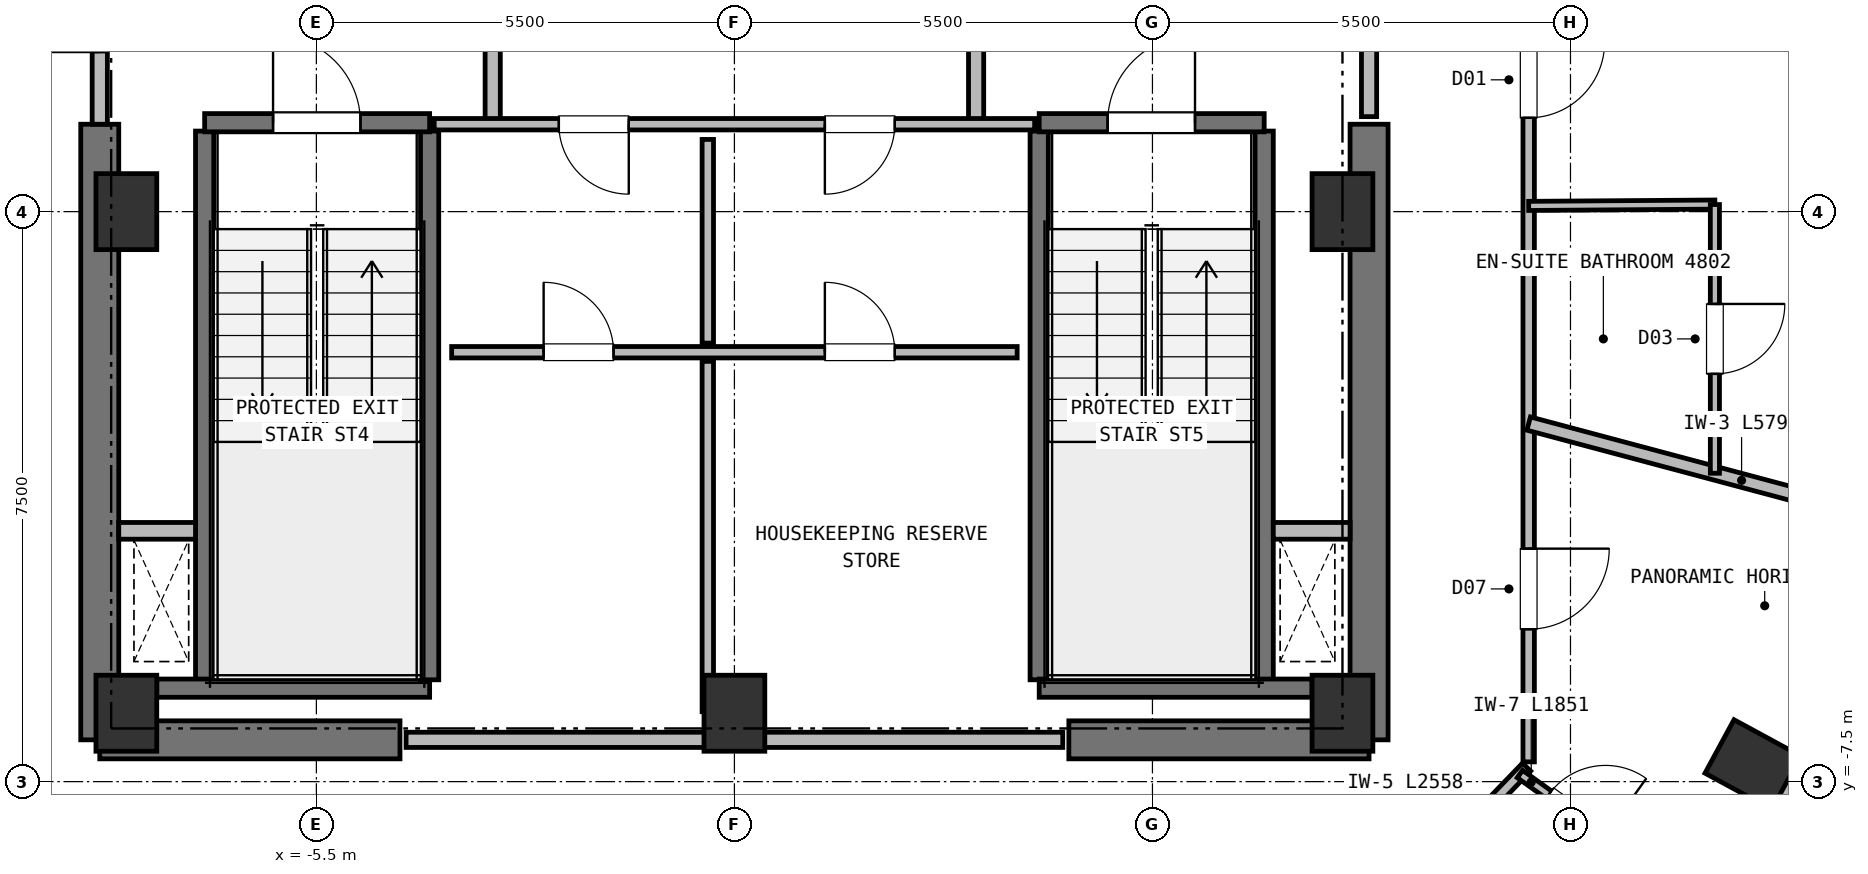
"""IFC4 building model, lengths in metres.
Left out: names, types, materials, properties, quantities, classifications, styles, units other than length and angle.
Written with IfcOpenShell. Run it as: python <this file> out.ifc"""

import sys

from ifc_helpers import new_model, si_unit, direction, frame, frame_2d, origin, origin_2d, place, context, subcontext, project, spatial, rectangle, extrude, element, fill, save


model = new_model("IFC4")
c1 = context("Model", 3, precision=1e-05, world=origin(), true_north=direction((0.0, 1.0)))
c2 = subcontext(c1, "Body", "Model", "MODEL_VIEW")
j1 = project(units=[si_unit("LENGTHUNIT", "METRE"), si_unit("PLANEANGLEUNIT", "RADIAN")], contexts=[c1])
p1 = place(None, origin())
s1 = spatial("IfcSite", under=j1, at=p1, CompositionType="ELEMENT")
p2 = place(p1, origin())
s2 = spatial("IfcBuilding", under=s1, at=p2, CompositionType="ELEMENT")
p3 = place(p2, frame((0.0, 0.0, 182.75)))
s3 = spatial("IfcBuildingStorey", under=s2, at=p3, CompositionType="ELEMENT", Elevation=182.75)
for number, where, z_axis, x_axis in (
    (1, (-8.0, -6.6, 0.0), (0.0, 0.0, 1.0), (1.0, 0.0, 0.0)),
    (2, (0.0, -6.6, 0.0), (0.0, 0.0, 1.0), (1.0, 0.0, 0.0)),
    (3, (8.0, -6.6, 0.0), (0.0, 0.0, 1.0), (1.0, 0.0, 0.0)),
    (4, (8.0, 0.0, 0.0), (0.0, 0.0, 1.0), (1.0, 0.0, 0.0)),
    (5, (-8.0, 0.0, 0.0), (0.0, 0.0, 1.0), (1.0, 0.0, 0.0)),
):
    element("IfcColumn", number, at=place(p3, frame(where, z_axis=z_axis, x_axis=x_axis)), inside=s3, PredefinedType="COLUMN", context=c2, shape_type="SweptSolid", body=[
        extrude(rectangle(XDim=0.8, YDim=1.0, at=origin_2d()), origin(), (0.0, 0.0, 1.0), 3.8),
    ])
for number, where, z_axis, x_axis in (
    (6, (-8.35, -6.95, 0.0), (0.0, 0.0, 1.0), (1.0, 0.0, 0.0)),
    (7, (4.4, -6.95, 0.0), (0.0, 0.0, 1.0), (1.0, 0.0, 0.0)),
):
    element("IfcWall", number, at=place(p3, frame(where, z_axis=z_axis, x_axis=x_axis)), inside=s3, PredefinedType="SHEAR", context=c2, shape_type="SweptSolid", body=[
        extrude(rectangle(XDim=3.95, YDim=0.5, at=frame_2d((1.975, 0.0))), origin(), (0.0, 0.0, 1.0), 3.55),
    ])
for number, where, z_axis, x_axis in (
    (8, (-8.35, -6.95, 0.0), (0.0, 0.0, 1.0), (0.0, 1.0, 0.0)),
    (9, (8.35, -6.95, 0.0), (0.0, 0.0, 1.0), (0.0, 1.0, 0.0)),
):
    element("IfcWall", number, at=place(p3, frame(where, z_axis=z_axis, x_axis=x_axis)), inside=s3, PredefinedType="SHEAR", context=c2, shape_type="SweptSolid", body=[
        extrude(rectangle(XDim=8.1, YDim=0.5, at=frame_2d((4.05, 0.0))), origin(), (0.0, 0.0, 1.0), 3.55),
    ])
p4 = place(p3, frame((13.4, -7.276, 0.0), z_axis=(0.0, 0.0, 1.0), x_axis=(0.47715876026, 0.878817112662, 0.0)))
e10 = element("IfcColumn", 10, at=p4, inside=s3, PredefinedType="COLUMN", context=c2, shape_type="SweptSolid", body=[
    extrude(rectangle(XDim=0.8, YDim=1.0, at=origin_2d()), origin(), (0.0, 0.0, 1.0), 3.8),
])
p5 = place(p3, frame((14.244, -7.209, 0.0), z_axis=(0.0, 0.0, 1.0), x_axis=(-0.5707327312, -0.821135889812, 0.0)))
e11 = element("IfcWall", 11, at=p5, inside=s3, PredefinedType="SOLIDWALL", context=c2, shape_type="SweptSolid", body=[
    extrude(rectangle(XDim=2.566, YDim=0.33, at=frame_2d((1.283, 0.0))), origin(), (0.0, 0.0, 1.0), 3.55),
])
p6 = place(p3, frame((-6.97, -6.16, 0.0), z_axis=(0.0, 0.0, 1.0), x_axis=(0.0, 1.0, 0.0)))
e12 = element("IfcWall", 12, at=p6, inside=s3, PredefinedType="SHEAR", context=c2, shape_type="SweptSolid", body=[
    extrude(rectangle(XDim=7.22, YDim=0.24, at=frame_2d((3.61, 0.0))), origin(), (0.0, 0.0, 1.0), 3.55),
])
p7 = place(p3, frame((-7.6, -6.27, 0.0), z_axis=(0.0, 0.0, 1.0), x_axis=(1.0, 0.0, 0.0)))
e13 = element("IfcWall", 13, at=p7, inside=s3, PredefinedType="SHEAR", context=c2, shape_type="SweptSolid", body=[
    extrude(rectangle(XDim=3.59, YDim=0.24, at=frame_2d((1.795, 0.0))), origin(), (0.0, 0.0, 1.0), 3.55),
])
p8 = place(p3, frame((-4.01, -6.16, 0.0), z_axis=(0.0, 0.0, 1.0), x_axis=(0.0, 1.0, 0.0)))
e14 = element("IfcWall", 14, at=p8, inside=s3, PredefinedType="SHEAR", context=c2, shape_type="SweptSolid", body=[
    extrude(rectangle(XDim=7.22, YDim=0.24, at=frame_2d((3.61, 0.0))), origin(), (0.0, 0.0, 1.0), 3.55),
])
p9 = place(p3, frame((-6.97, 1.17, 0.0), z_axis=(0.0, 0.0, 1.0), x_axis=(1.0, 0.0, 0.0)))
e15 = element("IfcWall", 15, at=p9, inside=s3, PredefinedType="SHEAR", context=c2, shape_type="SweptSolid", body=[
    extrude(rectangle(XDim=2.96, YDim=0.24, at=frame_2d((1.48, 0.0))), origin(), (0.0, 0.0, 1.0), 3.55),
])
p10 = place(p9, frame((0.9, 0.0, 0.0)))
e16 = element("IfcOpeningElement", 16, at=p10, cuts=e15, PredefinedType="OPENING", context=c2, shape_type="SweptSolid", body=[
    extrude(rectangle(XDim=1.15, YDim=2.15, at=frame_2d((0.575, 1.075))), frame((0.0, 0.13, 0.0), z_axis=(0.0, -1.0, 0.0), x_axis=(1.0, 0.0, 0.0)), (0.0, 0.0, 1.0), 0.26),
])
for number, where, z_axis, x_axis in (
    (17, (4.01, -6.16, 0.0), (0.0, 0.0, 1.0), (0.0, 1.0, 0.0)),
    (18, (6.97, -6.16, 0.0), (0.0, 0.0, 1.0), (0.0, 1.0, 0.0)),
):
    element("IfcWall", number, at=place(p3, frame(where, z_axis=z_axis, x_axis=x_axis)), inside=s3, PredefinedType="SHEAR", context=c2, shape_type="SweptSolid", body=[
        extrude(rectangle(XDim=7.22, YDim=0.24, at=frame_2d((3.61, 0.0))), origin(), (0.0, 0.0, 1.0), 3.55),
    ])
p11 = place(p3, frame((4.01, -6.27, 0.0), z_axis=(0.0, 0.0, 1.0), x_axis=(1.0, 0.0, 0.0)))
e19 = element("IfcWall", 19, at=p11, inside=s3, PredefinedType="SHEAR", context=c2, shape_type="SweptSolid", body=[
    extrude(rectangle(XDim=3.59, YDim=0.24, at=frame_2d((1.795, 0.0))), origin(), (0.0, 0.0, 1.0), 3.55),
])
p12 = place(p3, frame((4.01, 1.17, 0.0), z_axis=(0.0, 0.0, 1.0), x_axis=(1.0, 0.0, 0.0)))
e20 = element("IfcWall", 20, at=p12, inside=s3, PredefinedType="SHEAR", context=c2, shape_type="SweptSolid", body=[
    extrude(rectangle(XDim=2.96, YDim=0.24, at=frame_2d((1.48, 0.0))), origin(), (0.0, 0.0, 1.0), 3.55),
])
p13 = place(p12, frame((0.9, 0.0, 0.0)))
e21 = element("IfcOpeningElement", 21, at=p13, cuts=e20, PredefinedType="OPENING", context=c2, shape_type="SweptSolid", body=[
    extrude(rectangle(XDim=1.15, YDim=2.15, at=frame_2d((0.575, 1.075))), frame((0.0, 0.13, 0.0), z_axis=(0.0, -1.0, 0.0), x_axis=(1.0, 0.0, 0.0)), (0.0, 0.0, 1.0), 0.26),
])
for number, where, z_axis, x_axis in (
    (22, (-8.1, -4.2, 0.0), (0.0, 0.0, 1.0), (1.0, 0.0, 0.0)),
    (23, (7.09, -4.2, 0.0), (0.0, 0.0, 1.0), (1.0, 0.0, 0.0)),
):
    element("IfcWall", number, at=place(p3, frame(where, z_axis=z_axis, x_axis=x_axis)), inside=s3, PredefinedType="PARTITIONING", context=c2, shape_type="SweptSolid", body=[
        extrude(rectangle(XDim=1.01, YDim=0.22, at=frame_2d((0.505, 0.0))), origin(), (0.0, 0.0, 1.0), 3.55),
    ])
p14 = place(p3, frame((-3.18, 1.15, 0.0), z_axis=(0.0, 0.0, 1.0), x_axis=(0.0, 1.0, 0.0)))
e24 = element("IfcWall", 24, at=p14, inside=s3, PredefinedType="PARTITIONING", context=c2, shape_type="SweptSolid", body=[
    extrude(rectangle(XDim=3.3, YDim=0.2, at=frame_2d((1.65, 0.0))), origin(), (0.0, 0.0, 1.0), 3.55),
])
p15 = place(p14, frame((1.08, 0.0, 0.0)))
e25 = element("IfcOpeningElement", 25, at=p15, cuts=e24, PredefinedType="OPENING", context=c2, shape_type="SweptSolid", body=[
    extrude(rectangle(XDim=1.15, YDim=2.15, at=frame_2d((0.575, 1.075))), frame((0.0, 0.11, 0.0), z_axis=(0.0, -1.0, 0.0), x_axis=(1.0, 0.0, 0.0)), (0.0, 0.0, 1.0), 0.22),
])
p16 = place(p3, frame((3.18, 1.15, 0.0), z_axis=(0.0, 0.0, 1.0), x_axis=(0.0, 1.0, 0.0)))
e26 = element("IfcWall", 26, at=p16, inside=s3, PredefinedType="PARTITIONING", context=c2, shape_type="SweptSolid", body=[
    extrude(rectangle(XDim=3.3, YDim=0.2, at=frame_2d((1.65, 0.0))), origin(), (0.0, 0.0, 1.0), 3.55),
])
p17 = place(p16, frame((1.08, 0.0, 0.0)))
e27 = element("IfcOpeningElement", 27, at=p17, cuts=e26, PredefinedType="OPENING", context=c2, shape_type="SweptSolid", body=[
    extrude(rectangle(XDim=1.15, YDim=2.15, at=frame_2d((0.575, 1.075))), frame((0.0, 0.11, 0.0), z_axis=(0.0, -1.0, 0.0), x_axis=(1.0, 0.0, 0.0)), (0.0, 0.0, 1.0), 0.22),
])
p18 = place(p3, frame((-8.35, 1.15, 0.0), z_axis=(0.0, 0.0, 1.0), x_axis=(0.0, 1.0, 0.0)))
e28 = element("IfcWall", 28, at=p18, inside=s3, PredefinedType="PARTITIONING", context=c2, shape_type="SweptSolid", body=[
    extrude(rectangle(XDim=5.4, YDim=0.2, at=frame_2d((2.7, 0.0))), origin(), (0.0, 0.0, 1.0), 3.55),
])
p19 = place(p18, frame((0.95, 0.0, 0.0)))
e29 = element("IfcOpeningElement", 29, at=p19, cuts=e28, PredefinedType="OPENING", context=c2, shape_type="SweptSolid", body=[
    extrude(rectangle(XDim=1.15, YDim=2.15, at=frame_2d((0.575, 1.075))), frame((0.0, 0.11, 0.0), z_axis=(0.0, -1.0, 0.0), x_axis=(1.0, 0.0, 0.0)), (0.0, 0.0, 1.0), 0.22),
])
p20 = place(p3, frame((8.35, 1.25, 0.0), z_axis=(0.0, 0.0, 1.0), x_axis=(0.0, 1.0, 0.0)))
e30 = element("IfcWall", 30, at=p20, inside=s3, PredefinedType="PARTITIONING", context=c2, shape_type="SweptSolid", body=[
    extrude(rectangle(XDim=5.3, YDim=0.2, at=frame_2d((2.65, 0.0))), origin(), (0.0, 0.0, 1.0), 3.55),
])
p21 = place(p20, frame((0.95, 0.0, 0.0)))
e31 = element("IfcOpeningElement", 31, at=p21, cuts=e30, PredefinedType="OPENING", context=c2, shape_type="SweptSolid", body=[
    extrude(rectangle(XDim=1.15, YDim=2.15, at=frame_2d((0.575, 1.075))), frame((0.0, 0.11, 0.0), z_axis=(0.0, -1.0, 0.0), x_axis=(1.0, 0.0, 0.0)), (0.0, 0.0, 1.0), 0.22),
])
p22 = place(p3, frame((3.95, 1.15, 0.0), z_axis=(0.0, 0.0, 1.0), x_axis=(-1.0, 0.0, 0.0)))
e32 = element("IfcWall", 32, at=p22, inside=s3, PredefinedType="PARTITIONING", context=c2, shape_type="SweptSolid", body=[
    extrude(rectangle(XDim=7.9, YDim=0.15, at=frame_2d((3.95, 0.0))), origin(), (0.0, 0.0, 1.0), 3.55),
])
p23 = place(p22, frame((5.34, 0.0, 0.0)))
e33 = element("IfcOpeningElement", 33, at=p23, cuts=e32, PredefinedType="OPENING", context=c2, shape_type="SweptSolid", body=[
    extrude(rectangle(XDim=0.92, YDim=2.05, at=frame_2d((0.46, 1.025))), frame((0.0, 0.085, 0.0), z_axis=(0.0, -1.0, 0.0), x_axis=(1.0, 0.0, 0.0)), (0.0, 0.0, 1.0), 0.17),
])
p24 = place(p22, frame((1.84, 0.0, 0.0)))
e34 = element("IfcOpeningElement", 34, at=p24, cuts=e32, PredefinedType="OPENING", context=c2, shape_type="SweptSolid", body=[
    extrude(rectangle(XDim=0.92, YDim=2.05, at=frame_2d((0.46, 1.025))), frame((0.0, 0.085, 0.0), z_axis=(0.0, -1.0, 0.0), x_axis=(1.0, 0.0, 0.0)), (0.0, 0.0, 1.0), 0.17),
])
p25 = place(p3, frame((-4.32, -6.95, 0.0), z_axis=(0.0, 0.0, 1.0), x_axis=(1.0, 0.0, 0.0)))
e35 = element("IfcWall", 35, at=p25, inside=s3, PredefinedType="PARTITIONING", context=c2, shape_type="SweptSolid", body=[
    extrude(rectangle(XDim=8.64, YDim=0.2, at=frame_2d((4.32, 0.0))), origin(), (0.0, 0.0, 1.0), 3.55),
])
p26 = place(p3, frame((-3.72, -1.85, 0.0), z_axis=(0.0, 0.0, 1.0), x_axis=(1.0, 0.0, 0.0)))
e36 = element("IfcWall", 36, at=p26, inside=s3, PredefinedType="PARTITIONING", context=c2, shape_type="SweptSolid", body=[
    extrude(rectangle(XDim=7.44, YDim=0.15, at=frame_2d((3.72, 0.0))), origin(), (0.0, 0.0, 1.0), 3.55),
])
p27 = place(p26, frame((1.21, 0.0, 0.0)))
e37 = element("IfcOpeningElement", 37, at=p27, cuts=e36, PredefinedType="OPENING", context=c2, shape_type="SweptSolid", body=[
    extrude(rectangle(XDim=0.92, YDim=2.05, at=frame_2d((0.46, 1.025))), frame((0.0, 0.085, 0.0), z_axis=(0.0, -1.0, 0.0), x_axis=(1.0, 0.0, 0.0)), (0.0, 0.0, 1.0), 0.17),
])
p28 = place(p26, frame((4.91, 0.0, 0.0)))
e38 = element("IfcOpeningElement", 38, at=p28, cuts=e36, PredefinedType="OPENING", context=c2, shape_type="SweptSolid", body=[
    extrude(rectangle(XDim=0.92, YDim=2.05, at=frame_2d((0.46, 1.025))), frame((0.0, 0.085, 0.0), z_axis=(0.0, -1.0, 0.0), x_axis=(1.0, 0.0, 0.0)), (0.0, 0.0, 1.0), 0.17),
])
p29 = place(p3, frame((-0.35, -6.58, 0.0), z_axis=(0.0, 0.0, 1.0), x_axis=(0.0, 1.0, 0.0)))
e39 = element("IfcWall", 39, at=p29, inside=s3, PredefinedType="PARTITIONING", context=c2, shape_type="SweptSolid", body=[
    extrude(rectangle(XDim=4.61, YDim=0.15, at=frame_2d((2.305, 0.0))), origin(), (0.0, 0.0, 1.0), 3.55),
])
p30 = place(p3, frame((-0.35, -1.73, 0.0), z_axis=(0.0, 0.0, 1.0), x_axis=(0.0, 1.0, 0.0)))
e40 = element("IfcWall", 40, at=p30, inside=s3, PredefinedType="PARTITIONING", context=c2, shape_type="SweptSolid", body=[
    extrude(rectangle(XDim=2.68, YDim=0.15, at=frame_2d((1.34, 0.0))), origin(), (0.0, 0.0, 1.0), 3.55),
])
p31 = place(p3, frame((10.422, -7.309, 0.0), z_axis=(0.0, 0.0, 1.0), x_axis=(-0.693764562202, -0.720201869085, 0.0)))
e41 = element("IfcWall", 41, at=p31, inside=s3, PredefinedType="PARTITIONING", context=c2, shape_type="SweptSolid", body=[
    extrude(rectangle(XDim=2.558, YDim=0.15, at=frame_2d((1.279, 0.0))), origin(), (0.0, 0.0, 1.0), 3.23),
])
p32 = place(p3, frame((10.45, 7.24, 0.0), z_axis=(0.0, 0.0, 1.0), x_axis=(0.0, -1.0, 0.0)))
e42 = element("IfcWall", 42, at=p32, inside=s3, PredefinedType="PARTITIONING", context=c2, shape_type="SweptSolid", body=[
    extrude(rectangle(XDim=14.48, YDim=0.15, at=frame_2d((7.24, 0.0))), origin(), (0.0, 0.0, 1.0), 3.55),
])
p33 = place(p32, frame((11.674, 0.0, 0.0)))
e43 = element("IfcOpeningElement", 43, at=p33, cuts=e42, PredefinedType="OPENING", context=c2, shape_type="SweptSolid", body=[
    extrude(rectangle(XDim=1.06, YDim=2.15, at=frame_2d((0.53, 1.075))), frame((0.0, 0.085, 0.0), z_axis=(0.0, -1.0, 0.0), x_axis=(1.0, 0.0, 0.0)), (0.0, 0.0, 1.0), 0.17),
])
p34 = place(p32, frame((5.006, 0.0, 0.0)))
e44 = element("IfcOpeningElement", 44, at=p34, cuts=e42, PredefinedType="OPENING", context=c2, shape_type="SweptSolid", body=[
    extrude(rectangle(XDim=1.0, YDim=2.15, at=frame_2d((0.5, 1.075))), frame((0.0, 0.085, 0.0), z_axis=(0.0, -1.0, 0.0), x_axis=(1.0, 0.0, 0.0)), (0.0, 0.0, 1.0), 0.17),
])
p35 = place(p3, frame((-8.648, -9.151, 0.0), z_axis=(0.0, 0.0, 1.0), x_axis=(-0.693764562202, 0.720201869085, 0.0)))
e45 = element("IfcWall", 45, at=p35, inside=s3, PredefinedType="PARTITIONING", context=c2, shape_type="SweptSolid", body=[
    extrude(rectangle(XDim=2.558, YDim=0.15, at=frame_2d((1.279, 0.0))), origin(), (0.0, 0.0, 1.0), 3.23),
])
p36 = place(p3, frame((10.335, -7.399, 0.0), z_axis=(0.0, 0.0, 1.0), x_axis=(0.813020012063, -0.582235742621, 0.0)))
e46 = element("IfcWall", 46, at=p36, inside=s3, PredefinedType="PARTITIONING", context=c2, shape_type="SweptSolid", body=[
    extrude(rectangle(XDim=1.851, YDim=0.12, at=frame_2d((0.926, 0.0))), origin(), (0.0, 0.0, 1.0), 3.55),
])
p37 = place(p36, frame((0.466, 0.0, 0.0)))
e47 = element("IfcOpeningElement", 47, at=p37, cuts=e46, PredefinedType="OPENING", context=c2, shape_type="SweptSolid", body=[
    extrude(rectangle(XDim=0.92, YDim=2.1, at=frame_2d((0.46, 1.05))), frame((0.0, 0.07, 0.0), z_axis=(0.0, -1.0, 0.0), x_axis=(1.0, 0.0, 0.0)), (0.0, 0.0, 1.0), 0.14),
])
p38 = place(p3, frame((10.45, -2.788, 0.0), z_axis=(0.0, 0.0, 1.0), x_axis=(0.966187404049, -0.257840842879, 0.0)))
e48 = element("IfcWall", 48, at=p38, inside=s3, PredefinedType="PARTITIONING", context=c2, shape_type="SweptSolid", body=[
    extrude(rectangle(XDim=5.799, YDim=0.18, at=frame_2d((2.899, 0.0))), origin(), (0.0, 0.0, 1.0), 3.55),
])
p39 = place(p3, frame((10.45, 0.075, 0.0), z_axis=(0.0, 0.0, 1.0), x_axis=(0.999974261486, 0.007174703221, 0.0)))
e49 = element("IfcWall", 49, at=p39, inside=s3, PredefinedType="PARTITIONING", context=c2, shape_type="SweptSolid", body=[
    extrude(rectangle(XDim=2.45, YDim=0.12, at=frame_2d((1.225, 0.0))), origin(), (0.0, 0.0, 1.0), 2.63),
])
p40 = place(p3, frame((12.9, 0.093, 0.0), z_axis=(0.0, 0.0, 1.0), x_axis=(0.0, -1.0, 0.0)))
e50 = element("IfcWall", 50, at=p40, inside=s3, PredefinedType="PARTITIONING", context=c2, shape_type="SweptSolid", body=[
    extrude(rectangle(XDim=3.535, YDim=0.12, at=frame_2d((1.768, 0.0))), origin(), (0.0, 0.0, 1.0), 3.23),
])
p41 = place(p40, frame((1.308, 0.0, 0.0)))
e51 = element("IfcOpeningElement", 51, at=p41, cuts=e50, PredefinedType="OPENING", context=c2, shape_type="SweptSolid", body=[
    extrude(rectangle(XDim=0.92, YDim=2.1, at=frame_2d((0.46, 1.05))), frame((0.0, 0.07, 0.0), z_axis=(0.0, -1.0, 0.0), x_axis=(1.0, 0.0, 0.0)), (0.0, 0.0, 1.0), 0.14),
])
p42 = place(p10, origin())
e52 = element("IfcDoor", 52, at=p42, inside=s3, OperationType="SINGLE_SWING_LEFT", PredefinedType="DOOR", context=c2, shape_type="SweptSolid", body=[
    extrude(rectangle(XDim=1.15, YDim=2.15, at=frame_2d((0.575, 1.075))), frame((0.0, 0.025, 0.0), z_axis=(0.0, -1.0, 0.0), x_axis=(1.0, 0.0, 0.0)), (0.0, 0.0, 1.0), 0.05),
])
fill(e16, e52)
p43 = place(p13, origin())
e53 = element("IfcDoor", 53, at=p43, inside=s3, OperationType="SINGLE_SWING_RIGHT", PredefinedType="DOOR", context=c2, shape_type="SweptSolid", body=[
    extrude(rectangle(XDim=1.15, YDim=2.15, at=frame_2d((0.575, 1.075))), frame((0.0, 0.025, 0.0), z_axis=(0.0, -1.0, 0.0), x_axis=(1.0, 0.0, 0.0)), (0.0, 0.0, 1.0), 0.05),
])
fill(e21, e53)
p44 = place(p19, origin())
e54 = element("IfcDoor", 54, at=p44, inside=s3, OperationType="SINGLE_SWING_LEFT", PredefinedType="DOOR", context=c2, shape_type="SweptSolid", body=[
    extrude(rectangle(XDim=1.15, YDim=2.15, at=frame_2d((0.575, 1.075))), frame((0.0, 0.025, 0.0), z_axis=(0.0, -1.0, 0.0), x_axis=(1.0, 0.0, 0.0)), (0.0, 0.0, 1.0), 0.05),
])
fill(e29, e54)
p45 = place(p23, origin())
e55 = element("IfcDoor", 55, at=p45, inside=s3, OperationType="SINGLE_SWING_LEFT", PredefinedType="DOOR", context=c2, shape_type="SweptSolid", body=[
    extrude(rectangle(XDim=0.92, YDim=2.05, at=frame_2d((0.46, 1.025))), frame((0.0, 0.025, 0.0), z_axis=(0.0, -1.0, 0.0), x_axis=(1.0, 0.0, 0.0)), (0.0, 0.0, 1.0), 0.05),
])
fill(e33, e55)
p46 = place(p24, origin())
e56 = element("IfcDoor", 56, at=p46, inside=s3, OperationType="SINGLE_SWING_RIGHT", PredefinedType="DOOR", context=c2, shape_type="SweptSolid", body=[
    extrude(rectangle(XDim=0.92, YDim=2.05, at=frame_2d((0.46, 1.025))), frame((0.0, 0.025, 0.0), z_axis=(0.0, -1.0, 0.0), x_axis=(1.0, 0.0, 0.0)), (0.0, 0.0, 1.0), 0.05),
])
fill(e34, e56)
p47 = place(p27, origin())
e57 = element("IfcDoor", 57, at=p47, inside=s3, OperationType="SINGLE_SWING_LEFT", PredefinedType="DOOR", context=c2, shape_type="SweptSolid", body=[
    extrude(rectangle(XDim=0.92, YDim=2.05, at=frame_2d((0.46, 1.025))), frame((0.0, 0.025, 0.0), z_axis=(0.0, -1.0, 0.0), x_axis=(1.0, 0.0, 0.0)), (0.0, 0.0, 1.0), 0.05),
])
fill(e37, e57)
p48 = place(p28, origin())
e58 = element("IfcDoor", 58, at=p48, inside=s3, OperationType="SINGLE_SWING_LEFT", PredefinedType="DOOR", context=c2, shape_type="SweptSolid", body=[
    extrude(rectangle(XDim=0.92, YDim=2.05, at=frame_2d((0.46, 1.025))), frame((0.0, 0.025, 0.0), z_axis=(0.0, -1.0, 0.0), x_axis=(1.0, 0.0, 0.0)), (0.0, 0.0, 1.0), 0.05),
])
fill(e38, e58)
p49 = place(p37, origin())
e59 = element("IfcDoor", 59, at=p49, inside=s3, OperationType="SINGLE_SWING_RIGHT", PredefinedType="DOOR", context=c2, shape_type="SweptSolid", body=[
    extrude(rectangle(XDim=0.92, YDim=2.1, at=frame_2d((0.46, 1.05))), frame((0.0, 0.025, 0.0), z_axis=(0.0, -1.0, 0.0), x_axis=(1.0, 0.0, 0.0)), (0.0, 0.0, 1.0), 0.05),
])
fill(e47, e59)
p50 = place(p41, origin())
e60 = element("IfcDoor", 60, at=p50, inside=s3, OperationType="SINGLE_SWING_LEFT", PredefinedType="DOOR", context=c2, shape_type="SweptSolid", body=[
    extrude(rectangle(XDim=0.92, YDim=2.1, at=frame_2d((0.46, 1.05))), frame((0.0, 0.025, 0.0), z_axis=(0.0, -1.0, 0.0), x_axis=(1.0, 0.0, 0.0)), (0.0, 0.0, 1.0), 0.05),
])
fill(e51, e60)
p51 = place(p33, origin())
e61 = element("IfcDoor", 61, at=p51, inside=s3, OperationType="SINGLE_SWING_LEFT", PredefinedType="DOOR", context=c2, shape_type="SweptSolid", body=[
    extrude(rectangle(XDim=1.06, YDim=2.15, at=frame_2d((0.53, 1.075))), frame((0.0, 0.025, 0.0), z_axis=(0.0, -1.0, 0.0), x_axis=(1.0, 0.0, 0.0)), (0.0, 0.0, 1.0), 0.05),
])
fill(e43, e61)
p52 = place(p34, origin())
e62 = element("IfcDoor", 62, at=p52, inside=s3, OperationType="SINGLE_SWING_LEFT", PredefinedType="DOOR", context=c2, shape_type="SweptSolid", body=[
    extrude(rectangle(XDim=1.0, YDim=2.15, at=frame_2d((0.5, 1.075))), frame((0.0, 0.025, 0.0), z_axis=(0.0, -1.0, 0.0), x_axis=(1.0, 0.0, 0.0)), (0.0, 0.0, 1.0), 0.05),
])
fill(e44, e62)
save(model, sys.argv[1])
